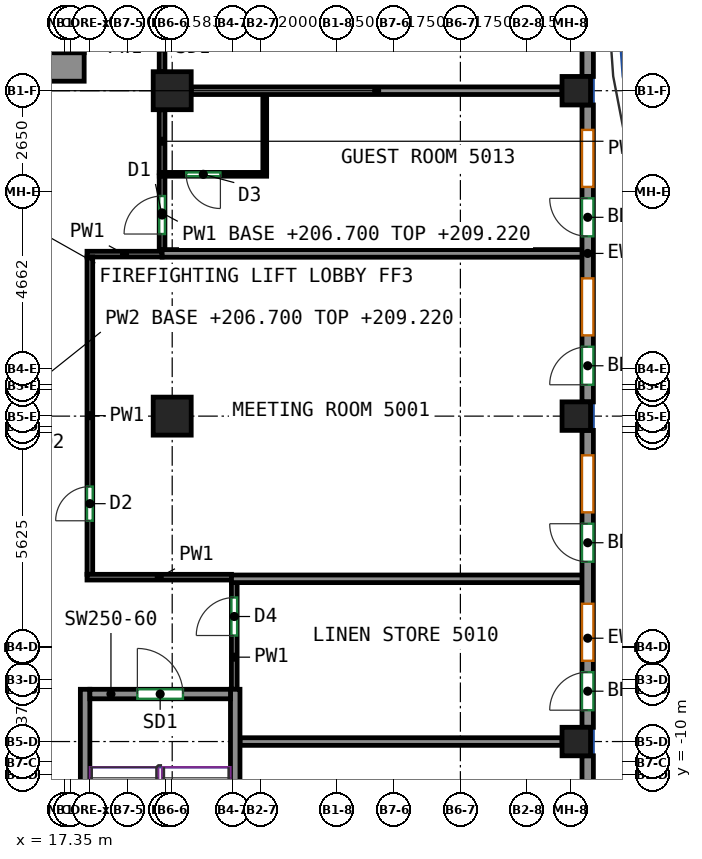
"""IFC4 building model, lengths in metres.
Left out: names, types, materials, properties, quantities, classifications, styles, units other than length and angle.
Written with IfcOpenShell. Run it as: python <this file> out.ifc"""

import sys

from ifc_helpers import new_model, si_unit, direction, frame, frame_2d, origin, origin_2d, place, context, subcontext, project, spatial, rectangle, extrude, source, transform, mapped, element, fill, save


model = new_model("IFC4")
c1 = context("Model", 3, precision=1e-05, world=origin(), true_north=direction((0.0, 1.0)))
c2 = subcontext(c1, "Body", "Model", "MODEL_VIEW")
j1 = project(units=[si_unit("LENGTHUNIT", "METRE"), si_unit("PLANEANGLEUNIT", "RADIAN")], contexts=[c1])
p1 = place(None, origin())
s1 = spatial("IfcSite", under=j1, at=p1, CompositionType="ELEMENT")
p2 = place(p1, origin())
s2 = spatial("IfcBuilding", under=s1, at=p2, CompositionType="ELEMENT")
p3 = place(p2, frame((0.0, 0.0, 206.7)))
s3 = spatial("IfcBuildingStorey", under=s2, at=p3, CompositionType="ELEMENT", Elevation=206.7)
m1 = source(origin(), c2, "Body", "SweptSolid", [
    extrude(rectangle(XDim=1.0, YDim=1.0, at=origin_2d()), origin(), (0.0, 0.0, 1.0), 3.12),
])
for number, where, z_axis, x_axis in (
    (1, (20.167, -0.562, 0.0), (0.0, 0.0, 1.0), (1.0, 0.0, 0.0)),
    (2, (20.167, 8.0, 0.0), (0.0, 0.0, 1.0), (1.0, 0.0, 0.0)),
):
    element("IfcColumn", number, at=place(p3, frame(where, z_axis=z_axis, x_axis=x_axis)), inside=s3, PredefinedType="COLUMN", context=c2, shape_type="MappedRepresentation", body=[
        mapped(m1, transform((0.0, 0.0, 0.0))),
    ])
m2 = source(origin(), c2, "Body", "SweptSolid", [
    extrude(rectangle(XDim=0.75, YDim=0.75, at=origin_2d()), origin(), (0.0, 0.0, 1.0), 3.12),
])
for number, where, z_axis, x_axis in (
    (3, (30.8, -9.125, 0.0), (0.0, 0.0, 1.0), (1.0, 0.0, 0.0)),
    (4, (30.8, -0.562, 0.0), (0.0, 0.0, 1.0), (1.0, 0.0, 0.0)),
    (5, (30.8, 8.0, 0.0), (0.0, 0.0, 1.0), (1.0, 0.0, 0.0)),
):
    element("IfcColumn", number, at=place(p3, frame(where, z_axis=z_axis, x_axis=x_axis)), inside=s3, PredefinedType="COLUMN", context=c2, shape_type="MappedRepresentation", body=[
        mapped(m2, transform((0.0, 0.0, 0.0))),
    ])
m3 = source(origin(), c2, "Body", "SweptSolid", [
    extrude(rectangle(XDim=5.38, YDim=0.75, at=frame_2d((2.69, 0.0))), origin(), (0.0, 0.0, 1.0), 3.12),
])
p4 = place(p3, frame((12.47, 8.625, 0.0), z_axis=(0.0, 0.0, 1.0), x_axis=(1.0, 0.0, 0.0)))
e6 = element("IfcWall", 6, at=p4, inside=s3, PredefinedType="SHEAR", context=c2, shape_type="MappedRepresentation", body=[
    mapped(m3, transform((0.0, 0.0, 0.0))),
])
p5 = place(p4, frame((2.18, 0.0, 0.0)))
e7 = element("IfcOpeningElement", 7, at=p5, cuts=e6, PredefinedType="OPENING", context=c2, shape_type="SweptSolid", body=[
    extrude(rectangle(XDim=1.2, YDim=2.1, at=frame_2d((0.6, 1.05))), frame((0.0, 0.385, 0.0), z_axis=(0.0, -1.0, 0.0), x_axis=(1.0, 0.0, 0.0)), (0.0, 0.0, 1.0), 0.77),
])
m4 = source(origin(), c2, "Body", "SweptSolid", [
    extrude(rectangle(XDim=8.0, YDim=0.25, at=frame_2d((4.0, 0.0))), origin(), (0.0, 0.0, 1.0), 3.12),
])
for number, where, z_axis, x_axis in (
    (8, (17.875, -15.75, 0.0), (0.0, 0.0, 1.0), (0.0, 1.0, 0.0)),
    (9, (21.825, -15.75, 0.0), (0.0, 0.0, 1.0), (0.0, 1.0, 0.0)),
):
    element("IfcWall", number, at=place(p3, frame(where, z_axis=z_axis, x_axis=x_axis)), inside=s3, PredefinedType="SHEAR", context=c2, shape_type="MappedRepresentation", body=[
        mapped(m4, transform((0.0, 0.0, 0.0))),
    ])
m5 = source(origin(), c2, "Body", "SweptSolid", [
    extrude(rectangle(XDim=3.7, YDim=0.25, at=frame_2d((1.85, 0.0))), origin(), (0.0, 0.0, 1.0), 3.12),
])
p6 = place(p3, frame((18.0, -7.875, 0.0), z_axis=(0.0, 0.0, 1.0), x_axis=(1.0, 0.0, 0.0)))
e10 = element("IfcWall", 10, at=p6, inside=s3, PredefinedType="SHEAR", context=c2, shape_type="MappedRepresentation", body=[
    mapped(m5, transform((0.0, 0.0, 0.0))),
])
p7 = place(p6, frame((1.25, 0.0, 0.0)))
e11 = element("IfcOpeningElement", 11, at=p7, cuts=e10, PredefinedType="OPENING", context=c2, shape_type="SweptSolid", body=[
    extrude(rectangle(XDim=1.2, YDim=2.1, at=frame_2d((0.6, 1.05))), frame((0.0, 0.135, 0.0), z_axis=(0.0, -1.0, 0.0), x_axis=(1.0, 0.0, 0.0)), (0.0, 0.0, 1.0), 0.27),
])
m6 = source(origin(), c2, "Body", "SweptSolid", [
    extrude(rectangle(XDim=7.812, YDim=0.3, at=frame_2d((3.906, 0.0))), origin(), (0.0, 0.0, 1.0), 3.12),
])
p8 = place(p3, frame((31.1, -17.312, 0.0), z_axis=(0.0, 0.0, 1.0), x_axis=(0.0, 1.0, 0.0)))
e12 = element("IfcWall", 12, at=p8, inside=s3, PredefinedType="SOLIDWALL", context=c2, shape_type="MappedRepresentation", body=[
    mapped(m6, transform((0.0, 0.0, 0.0))),
])
p9 = place(p8, frame((1.75, 0.0, 0.85)))
e13 = element("IfcOpeningElement", 13, at=p9, cuts=e12, PredefinedType="OPENING", context=c2, shape_type="SweptSolid", body=[
    extrude(rectangle(XDim=1.5, YDim=1.95, at=frame_2d((0.75, 0.975))), frame((0.0, 0.16, 0.0), z_axis=(0.0, -1.0, 0.0), x_axis=(1.0, 0.0, 0.0)), (0.0, 0.0, 1.0), 0.32),
])
p10 = place(p8, frame((5.656, 0.0, 0.85)))
e14 = element("IfcOpeningElement", 14, at=p10, cuts=e12, PredefinedType="OPENING", context=c2, shape_type="SweptSolid", body=[
    extrude(rectangle(XDim=1.5, YDim=1.95, at=frame_2d((0.75, 0.975))), frame((0.0, 0.16, 0.0), z_axis=(0.0, -1.0, 0.0), x_axis=(1.0, 0.0, 0.0)), (0.0, 0.0, 1.0), 0.32),
])
p11 = place(p3, frame((31.1, -8.75, 0.0), z_axis=(0.0, 0.0, 1.0), x_axis=(0.0, 1.0, 0.0)))
e15 = element("IfcWall", 15, at=p11, inside=s3, PredefinedType="SOLIDWALL", context=c2, shape_type="MappedRepresentation", body=[
    mapped(m6, transform((0.0, 0.0, 0.0))),
])
p12 = place(p11, frame((1.75, 0.0, 0.85)))
e16 = element("IfcOpeningElement", 16, at=p12, cuts=e15, PredefinedType="OPENING", context=c2, shape_type="SweptSolid", body=[
    extrude(rectangle(XDim=1.5, YDim=1.95, at=frame_2d((0.75, 0.975))), frame((0.0, 0.16, 0.0), z_axis=(0.0, -1.0, 0.0), x_axis=(1.0, 0.0, 0.0)), (0.0, 0.0, 1.0), 0.32),
])
p13 = place(p11, frame((0.45, 0.0, 0.0)))
e17 = element("IfcOpeningElement", 17, at=p13, cuts=e15, PredefinedType="OPENING", context=c2, shape_type="SweptSolid", body=[
    extrude(rectangle(XDim=1.0, YDim=2.1, at=frame_2d((0.5, 1.05))), frame((0.0, 0.16, 0.0), z_axis=(0.0, -1.0, 0.0), x_axis=(1.0, 0.0, 0.0)), (0.0, 0.0, 1.0), 0.32),
])
p14 = place(p11, frame((5.656, 0.0, 0.85)))
e18 = element("IfcOpeningElement", 18, at=p14, cuts=e15, PredefinedType="OPENING", context=c2, shape_type="SweptSolid", body=[
    extrude(rectangle(XDim=1.5, YDim=1.95, at=frame_2d((0.75, 0.975))), frame((0.0, 0.16, 0.0), z_axis=(0.0, -1.0, 0.0), x_axis=(1.0, 0.0, 0.0)), (0.0, 0.0, 1.0), 0.32),
])
p15 = place(p11, frame((4.356, 0.0, 0.0)))
e19 = element("IfcOpeningElement", 19, at=p15, cuts=e15, PredefinedType="OPENING", context=c2, shape_type="SweptSolid", body=[
    extrude(rectangle(XDim=1.0, YDim=2.1, at=frame_2d((0.5, 1.05))), frame((0.0, 0.16, 0.0), z_axis=(0.0, -1.0, 0.0), x_axis=(1.0, 0.0, 0.0)), (0.0, 0.0, 1.0), 0.32),
])
p16 = place(p3, frame((31.1, -0.188, 0.0), z_axis=(0.0, 0.0, 1.0), x_axis=(0.0, 1.0, 0.0)))
e20 = element("IfcWall", 20, at=p16, inside=s3, PredefinedType="SOLIDWALL", context=c2, shape_type="MappedRepresentation", body=[
    mapped(m6, transform((0.0, 0.0, 0.0))),
])
p17 = place(p16, frame((1.75, 0.0, 0.85)))
e21 = element("IfcOpeningElement", 21, at=p17, cuts=e20, PredefinedType="OPENING", context=c2, shape_type="SweptSolid", body=[
    extrude(rectangle(XDim=1.5, YDim=1.95, at=frame_2d((0.75, 0.975))), frame((0.0, 0.16, 0.0), z_axis=(0.0, -1.0, 0.0), x_axis=(1.0, 0.0, 0.0)), (0.0, 0.0, 1.0), 0.32),
])
p18 = place(p16, frame((0.45, 0.0, 0.0)))
e22 = element("IfcOpeningElement", 22, at=p18, cuts=e20, PredefinedType="OPENING", context=c2, shape_type="SweptSolid", body=[
    extrude(rectangle(XDim=1.0, YDim=2.1, at=frame_2d((0.5, 1.05))), frame((0.0, 0.16, 0.0), z_axis=(0.0, -1.0, 0.0), x_axis=(1.0, 0.0, 0.0)), (0.0, 0.0, 1.0), 0.32),
])
p19 = place(p16, frame((5.656, 0.0, 0.85)))
e23 = element("IfcOpeningElement", 23, at=p19, cuts=e20, PredefinedType="OPENING", context=c2, shape_type="SweptSolid", body=[
    extrude(rectangle(XDim=1.5, YDim=1.95, at=frame_2d((0.75, 0.975))), frame((0.0, 0.16, 0.0), z_axis=(0.0, -1.0, 0.0), x_axis=(1.0, 0.0, 0.0)), (0.0, 0.0, 1.0), 0.32),
])
p20 = place(p16, frame((4.356, 0.0, 0.0)))
e24 = element("IfcOpeningElement", 24, at=p20, cuts=e20, PredefinedType="OPENING", context=c2, shape_type="SweptSolid", body=[
    extrude(rectangle(XDim=1.0, YDim=2.1, at=frame_2d((0.5, 1.05))), frame((0.0, 0.16, 0.0), z_axis=(0.0, -1.0, 0.0), x_axis=(1.0, 0.0, 0.0)), (0.0, 0.0, 1.0), 0.32),
])
m7 = source(origin(), c2, "Body", "SweptSolid", [
    extrude(rectangle(XDim=14.0, YDim=0.3, at=frame_2d((7.0, 0.0))), origin(), (0.0, 0.0, 1.0), 3.12),
])
p21 = place(p3, frame((31.1, 8.375, 0.0), z_axis=(0.0, 0.0, 1.0), x_axis=(0.0, 1.0, 0.0)))
e25 = element("IfcWall", 25, at=p21, inside=s3, PredefinedType="SOLIDWALL", context=c2, shape_type="MappedRepresentation", body=[
    mapped(m7, transform((0.0, 0.0, 0.0))),
])
p22 = place(p21, frame((1.75, 0.0, 0.85)))
e26 = element("IfcOpeningElement", 26, at=p22, cuts=e25, PredefinedType="OPENING", context=c2, shape_type="SweptSolid", body=[
    extrude(rectangle(XDim=1.5, YDim=1.95, at=frame_2d((0.75, 0.975))), frame((0.0, 0.16, 0.0), z_axis=(0.0, -1.0, 0.0), x_axis=(1.0, 0.0, 0.0)), (0.0, 0.0, 1.0), 0.32),
])
p23 = place(p21, frame((5.25, 0.0, 0.85)))
e27 = element("IfcOpeningElement", 27, at=p23, cuts=e25, PredefinedType="OPENING", context=c2, shape_type="SweptSolid", body=[
    extrude(rectangle(XDim=1.5, YDim=1.95, at=frame_2d((0.75, 0.975))), frame((0.0, 0.16, 0.0), z_axis=(0.0, -1.0, 0.0), x_axis=(1.0, 0.0, 0.0)), (0.0, 0.0, 1.0), 0.32),
])
p24 = place(p21, frame((8.75, 0.0, 0.85)))
e28 = element("IfcOpeningElement", 28, at=p24, cuts=e25, PredefinedType="OPENING", context=c2, shape_type="SweptSolid", body=[
    extrude(rectangle(XDim=1.5, YDim=1.95, at=frame_2d((0.75, 0.975))), frame((0.0, 0.16, 0.0), z_axis=(0.0, -1.0, 0.0), x_axis=(1.0, 0.0, 0.0)), (0.0, 0.0, 1.0), 0.32),
])
p25 = place(p21, frame((12.25, 0.0, 0.85)))
e29 = element("IfcOpeningElement", 29, at=p25, cuts=e25, PredefinedType="OPENING", context=c2, shape_type="SweptSolid", body=[
    extrude(rectangle(XDim=1.5, YDim=1.95, at=frame_2d((0.75, 0.975))), frame((0.0, 0.16, 0.0), z_axis=(0.0, -1.0, 0.0), x_axis=(1.0, 0.0, 0.0)), (0.0, 0.0, 1.0), 0.32),
])
p26 = place(p21, frame((10.95, 0.0, 0.0)))
e30 = element("IfcOpeningElement", 30, at=p26, cuts=e25, PredefinedType="OPENING", context=c2, shape_type="SweptSolid", body=[
    extrude(rectangle(XDim=1.0, YDim=2.1, at=frame_2d((0.5, 1.05))), frame((0.0, 0.16, 0.0), z_axis=(0.0, -1.0, 0.0), x_axis=(1.0, 0.0, 0.0)), (0.0, 0.0, 1.0), 0.32),
])
p27 = place(p3, frame((19.9, 3.809, 0.0), z_axis=(0.0, 0.0, 1.0), x_axis=(0.0, 1.0, 0.0)))
e31 = element("IfcWall", 31, at=p27, inside=s3, PredefinedType="PARTITIONING", context=c2, shape_type="SweptSolid", body=[
    extrude(rectangle(XDim=1.951, YDim=0.15, at=frame_2d((0.976, 0.0))), origin(), (0.0, 0.0, 1.0), 2.52),
])
p28 = place(p27, frame((0.42, 0.0, 0.0)))
e32 = element("IfcOpeningElement", 32, at=p28, cuts=e31, PredefinedType="OPENING", context=c2, shape_type="SweptSolid", body=[
    extrude(rectangle(XDim=1.0, YDim=2.1, at=frame_2d((0.5, 1.05))), frame((0.0, 0.085, 0.0), z_axis=(0.0, -1.0, 0.0), x_axis=(1.0, 0.0, 0.0)), (0.0, 0.0, 1.0), 0.17),
])
p29 = place(p3, frame((19.9, 5.84, 0.0), z_axis=(0.0, 0.0, 1.0), x_axis=(0.0, 1.0, 0.0)))
e33 = element("IfcWall", 33, at=p29, inside=s3, PredefinedType="PARTITIONING", context=c2, shape_type="SweptSolid", body=[
    extrude(rectangle(XDim=1.66, YDim=0.15, at=frame_2d((0.83, 0.0))), origin(), (0.0, 0.0, 1.0), 2.52),
])
p30 = place(p3, frame((19.9, 8.5, 0.0), z_axis=(0.0, 0.0, 1.0), x_axis=(0.0, 1.0, 0.0)))
e34 = element("IfcWall", 34, at=p30, inside=s3, PredefinedType="PARTITIONING", context=c2, shape_type="SweptSolid", body=[
    extrude(rectangle(XDim=1.25, YDim=0.15, at=frame_2d((0.625, 0.0))), origin(), (0.0, 0.0, 1.0), 3.12),
])
p31 = place(p3, frame((17.925, 3.7, 0.0), z_axis=(0.0, 0.0, 1.0), x_axis=(1.0, 0.0, 0.0)))
e35 = element("IfcWall", 35, at=p31, inside=s3, PredefinedType="PARTITIONING", context=c2, shape_type="SweptSolid", body=[
    extrude(rectangle(XDim=1.975, YDim=0.15, at=frame_2d((0.987, 0.0))), origin(), (0.0, 0.0, 1.0), 3.12),
])
p32 = place(p3, frame((18.0, -4.725, 0.0), z_axis=(0.0, 0.0, 1.0), x_axis=(0.0, 1.0, 0.0)))
e36 = element("IfcWall", 36, at=p32, inside=s3, PredefinedType="PARTITIONING", context=c2, shape_type="SweptSolid", body=[
    extrude(rectangle(XDim=8.35, YDim=0.15, at=frame_2d((4.175, 0.0))), origin(), (0.0, 0.0, 1.0), 3.12),
])
p33 = place(p32, frame((1.409, 0.0, 0.0)))
e37 = element("IfcOpeningElement", 37, at=p33, cuts=e36, PredefinedType="OPENING", context=c2, shape_type="SweptSolid", body=[
    extrude(rectangle(XDim=0.9, YDim=2.1, at=frame_2d((0.45, 1.05))), frame((0.0, 0.085, 0.0), z_axis=(0.0, -1.0, 0.0), x_axis=(1.0, 0.0, 0.0)), (0.0, 0.0, 1.0), 0.17),
])
p34 = place(p3, frame((17.925, -4.8, 0.0), z_axis=(0.0, 0.0, 1.0), x_axis=(1.0, 0.0, 0.0)))
e38 = element("IfcWall", 38, at=p34, inside=s3, PredefinedType="PARTITIONING", context=c2, shape_type="SweptSolid", body=[
    extrude(rectangle(XDim=3.802, YDim=0.15, at=frame_2d((1.901, 0.0))), origin(), (0.0, 0.0, 1.0), 3.12),
])
p35 = place(p3, frame((21.8, -7.75, 0.0), z_axis=(0.0, 0.0, 1.0), x_axis=(0.0, 1.0, 0.0)))
e39 = element("IfcWall", 39, at=p35, inside=s3, PredefinedType="PARTITIONING", context=c2, shape_type="SweptSolid", body=[
    extrude(rectangle(XDim=2.817, YDim=0.15, at=frame_2d((1.408, 0.0))), origin(), (0.0, 0.0, 1.0), 3.12),
])
p36 = place(p35, frame((1.415, 0.0, 0.0)))
e40 = element("IfcOpeningElement", 40, at=p36, cuts=e39, PredefinedType="OPENING", context=c2, shape_type="SweptSolid", body=[
    extrude(rectangle(XDim=1.0, YDim=2.1, at=frame_2d((0.5, 1.05))), frame((0.0, 0.085, 0.0), z_axis=(0.0, -1.0, 0.0), x_axis=(1.0, 0.0, 0.0)), (0.0, 0.0, 1.0), 0.17),
])
p37 = place(p3, frame((22.652, 5.8, 0.0), z_axis=(0.0, 0.0, 1.0), x_axis=(-1.0, 0.0, 0.0)))
e41 = element("IfcWall", 41, at=p37, inside=s3, PredefinedType="PARTITIONING", context=c2, shape_type="SweptSolid", body=[
    extrude(rectangle(XDim=2.825, YDim=0.1, at=frame_2d((1.413, 0.0))), origin(), (0.0, 0.0, 1.0), 3.12),
])
p38 = place(p37, frame((1.217, 0.0, 0.0)))
e42 = element("IfcOpeningElement", 42, at=p38, cuts=e41, PredefinedType="OPENING", context=c2, shape_type="SweptSolid", body=[
    extrude(rectangle(XDim=0.9, YDim=2.1, at=frame_2d((0.45, 1.05))), frame((0.0, 0.06, 0.0), z_axis=(0.0, -1.0, 0.0), x_axis=(1.0, 0.0, 0.0)), (0.0, 0.0, 1.0), 0.12),
])
p39 = place(p3, frame((22.602, 5.85, 0.0), z_axis=(0.0, 0.0, 1.0), x_axis=(0.0, 1.0, 0.0)))
e43 = element("IfcWall", 43, at=p39, inside=s3, PredefinedType="PARTITIONING", context=c2, shape_type="SweptSolid", body=[
    extrude(rectangle(XDim=2.05, YDim=0.1, at=frame_2d((1.025, 0.0))), origin(), (0.0, 0.0, 1.0), 3.12),
])
p40 = place(p3, frame((19.902, 3.719, 0.0), z_axis=(0.0, 0.0, 1.0), x_axis=(1.0, 0.0, 0.0)))
e44 = element("IfcWall", 44, at=p40, inside=s3, PredefinedType="PARTITIONING", context=c2, shape_type="SweptSolid", body=[
    extrude(rectangle(XDim=11.098, YDim=0.2, at=frame_2d((5.549, 0.0))), origin(), (0.0, 0.0, 1.0), 3.12),
])
p41 = place(p3, frame((20.667, 8.0, 0.0), z_axis=(0.0, 0.0, 1.0), x_axis=(1.0, 0.0, 0.0)))
e45 = element("IfcWall", 45, at=p41, inside=s3, PredefinedType="PARTITIONING", context=c2, shape_type="SweptSolid", body=[
    extrude(rectangle(XDim=9.758, YDim=0.2, at=frame_2d((4.879, 0.0))), origin(), (0.0, 0.0, 1.0), 2.52),
])
p42 = place(p3, frame((21.727, -4.843, 0.0), z_axis=(0.0, 0.0, 1.0), x_axis=(1.0, 0.0, 0.0)))
e46 = element("IfcWall", 46, at=p42, inside=s3, PredefinedType="PARTITIONING", context=c2, shape_type="SweptSolid", body=[
    extrude(rectangle(XDim=9.273, YDim=0.2, at=frame_2d((4.636, 0.0))), origin(), (0.0, 0.0, 1.0), 3.12),
])
p43 = place(p3, frame((21.95, -9.125, 0.0), z_axis=(0.0, 0.0, 1.0), x_axis=(1.0, 0.0, 0.0)))
e47 = element("IfcWall", 47, at=p43, inside=s3, PredefinedType="PARTITIONING", context=c2, shape_type="SweptSolid", body=[
    extrude(rectangle(XDim=8.475, YDim=0.2, at=frame_2d((4.238, 0.0))), origin(), (0.0, 0.0, 1.0), 3.12),
])
p44 = place(p12, origin())
e48 = element("IfcWindow", 48, at=p44, inside=s3, PartitioningType="SINGLE_PANEL", PredefinedType="WINDOW", context=c2, shape_type="SweptSolid", body=[
    extrude(rectangle(XDim=1.5, YDim=1.95, at=frame_2d((0.75, 0.975))), frame((0.0, 0.03, 0.0), z_axis=(0.0, -1.0, 0.0), x_axis=(1.0, 0.0, 0.0)), (0.0, 0.0, 1.0), 0.06),
])
fill(e16, e48)
p45 = place(p13, origin())
e49 = element("IfcDoor", 49, at=p45, inside=s3, OperationType="SINGLE_SWING_LEFT", PredefinedType="DOOR", context=c2, shape_type="SweptSolid", body=[
    extrude(rectangle(XDim=1.0, YDim=2.1, at=frame_2d((0.5, 1.05))), frame((0.0, 0.025, 0.0), z_axis=(0.0, -1.0, 0.0), x_axis=(1.0, 0.0, 0.0)), (0.0, 0.0, 1.0), 0.05),
])
fill(e17, e49)
p46 = place(p14, origin())
e50 = element("IfcWindow", 50, at=p46, inside=s3, PartitioningType="SINGLE_PANEL", PredefinedType="WINDOW", context=c2, shape_type="SweptSolid", body=[
    extrude(rectangle(XDim=1.5, YDim=1.95, at=frame_2d((0.75, 0.975))), frame((0.0, 0.03, 0.0), z_axis=(0.0, -1.0, 0.0), x_axis=(1.0, 0.0, 0.0)), (0.0, 0.0, 1.0), 0.06),
])
fill(e18, e50)
p47 = place(p15, origin())
e51 = element("IfcDoor", 51, at=p47, inside=s3, OperationType="SINGLE_SWING_RIGHT", PredefinedType="DOOR", context=c2, shape_type="SweptSolid", body=[
    extrude(rectangle(XDim=1.0, YDim=2.1, at=frame_2d((0.5, 1.05))), frame((0.0, 0.025, 0.0), z_axis=(0.0, -1.0, 0.0), x_axis=(1.0, 0.0, 0.0)), (0.0, 0.0, 1.0), 0.05),
])
fill(e19, e51)
p48 = place(p17, origin())
e52 = element("IfcWindow", 52, at=p48, inside=s3, PartitioningType="SINGLE_PANEL", PredefinedType="WINDOW", context=c2, shape_type="SweptSolid", body=[
    extrude(rectangle(XDim=1.5, YDim=1.95, at=frame_2d((0.75, 0.975))), frame((0.0, 0.03, 0.0), z_axis=(0.0, -1.0, 0.0), x_axis=(1.0, 0.0, 0.0)), (0.0, 0.0, 1.0), 0.06),
])
fill(e21, e52)
p49 = place(p18, origin())
e53 = element("IfcDoor", 53, at=p49, inside=s3, OperationType="SINGLE_SWING_LEFT", PredefinedType="DOOR", context=c2, shape_type="SweptSolid", body=[
    extrude(rectangle(XDim=1.0, YDim=2.1, at=frame_2d((0.5, 1.05))), frame((0.0, 0.025, 0.0), z_axis=(0.0, -1.0, 0.0), x_axis=(1.0, 0.0, 0.0)), (0.0, 0.0, 1.0), 0.05),
])
fill(e22, e53)
p50 = place(p19, origin())
e54 = element("IfcWindow", 54, at=p50, inside=s3, PartitioningType="SINGLE_PANEL", PredefinedType="WINDOW", context=c2, shape_type="SweptSolid", body=[
    extrude(rectangle(XDim=1.5, YDim=1.95, at=frame_2d((0.75, 0.975))), frame((0.0, 0.03, 0.0), z_axis=(0.0, -1.0, 0.0), x_axis=(1.0, 0.0, 0.0)), (0.0, 0.0, 1.0), 0.06),
])
fill(e23, e54)
p51 = place(p20, origin())
e55 = element("IfcDoor", 55, at=p51, inside=s3, OperationType="SINGLE_SWING_RIGHT", PredefinedType="DOOR", context=c2, shape_type="SweptSolid", body=[
    extrude(rectangle(XDim=1.0, YDim=2.1, at=frame_2d((0.5, 1.05))), frame((0.0, 0.025, 0.0), z_axis=(0.0, -1.0, 0.0), x_axis=(1.0, 0.0, 0.0)), (0.0, 0.0, 1.0), 0.05),
])
fill(e24, e55)
p52 = place(p7, origin())
e56 = element("IfcDoor", 56, at=p52, inside=s3, OperationType="DOUBLE_DOOR_SINGLE_SWING", PredefinedType="DOOR", context=c2, shape_type="SweptSolid", body=[
    extrude(rectangle(XDim=1.2, YDim=2.1, at=frame_2d((0.6, 1.05))), frame((0.0, 0.025, 0.0), z_axis=(0.0, -1.0, 0.0), x_axis=(1.0, 0.0, 0.0)), (0.0, 0.0, 1.0), 0.05),
])
fill(e11, e56)
p53 = place(p36, origin())
e57 = element("IfcDoor", 57, at=p53, inside=s3, OperationType="SINGLE_SWING_LEFT", PredefinedType="DOOR", context=c2, shape_type="SweptSolid", body=[
    extrude(rectangle(XDim=1.0, YDim=2.1, at=frame_2d((0.5, 1.05))), frame((0.0, 0.025, 0.0), z_axis=(0.0, -1.0, 0.0), x_axis=(1.0, 0.0, 0.0)), (0.0, 0.0, 1.0), 0.05),
])
fill(e40, e57)
p54 = place(p33, origin())
e58 = element("IfcDoor", 58, at=p54, inside=s3, OperationType="SINGLE_SWING_LEFT", PredefinedType="DOOR", context=c2, shape_type="SweptSolid", body=[
    extrude(rectangle(XDim=0.9, YDim=2.1, at=frame_2d((0.45, 1.05))), frame((0.0, 0.025, 0.0), z_axis=(0.0, -1.0, 0.0), x_axis=(1.0, 0.0, 0.0)), (0.0, 0.0, 1.0), 0.05),
])
fill(e37, e58)
p55 = place(p28, origin())
e59 = element("IfcDoor", 59, at=p55, inside=s3, OperationType="SINGLE_SWING_LEFT", PredefinedType="DOOR", context=c2, shape_type="SweptSolid", body=[
    extrude(rectangle(XDim=1.0, YDim=2.1, at=frame_2d((0.5, 1.05))), frame((0.0, 0.025, 0.0), z_axis=(0.0, -1.0, 0.0), x_axis=(1.0, 0.0, 0.0)), (0.0, 0.0, 1.0), 0.05),
])
fill(e32, e59)
p56 = place(p38, origin())
e60 = element("IfcDoor", 60, at=p56, inside=s3, OperationType="SINGLE_SWING_LEFT", PredefinedType="DOOR", context=c2, shape_type="SweptSolid", body=[
    extrude(rectangle(XDim=0.9, YDim=2.1, at=frame_2d((0.45, 1.05))), frame((0.0, 0.025, 0.0), z_axis=(0.0, -1.0, 0.0), x_axis=(1.0, 0.0, 0.0)), (0.0, 0.0, 1.0), 0.05),
])
fill(e42, e60)
save(model, sys.argv[1])
